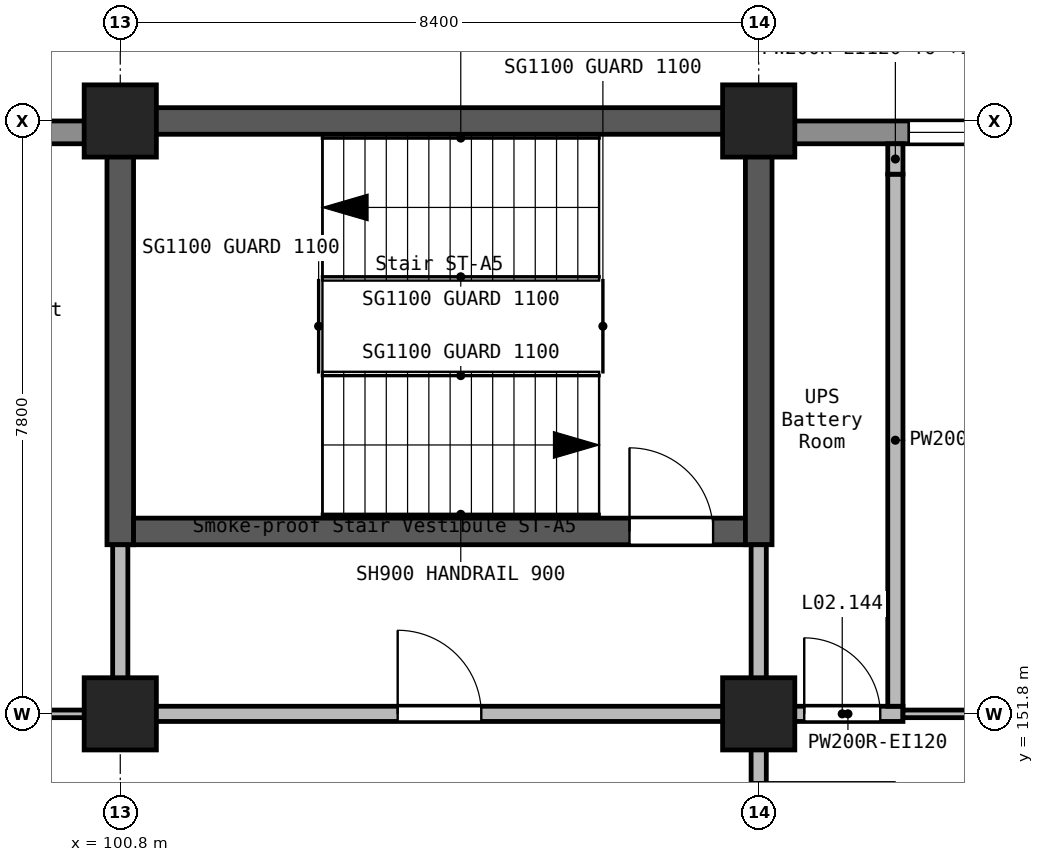
"""IFC4 building model, lengths in metres.
Left out: names, types, materials, properties, quantities, classifications, styles, units other than length and angle.
Written with IfcOpenShell. Run it as: python <this file> out.ifc"""

import sys

from ifc_helpers import new_model, si_unit, direction, frame, frame_2d, origin, origin_2d, place, context, subcontext, project, spatial, rectangle, extrude, element, fill, save


model = new_model("IFC4")
c1 = context("Model", 3, precision=1e-05, world=origin(), true_north=direction((0.0, 1.0)))
c2 = subcontext(c1, "Body", "Model", "MODEL_VIEW")
j1 = project(units=[si_unit("LENGTHUNIT", "METRE"), si_unit("PLANEANGLEUNIT", "RADIAN")], contexts=[c1])
p1 = place(None, origin())
s1 = spatial("IfcSite", under=j1, at=p1, CompositionType="ELEMENT")
p2 = place(p1, origin())
s2 = spatial("IfcBuilding", under=s1, at=p2, CompositionType="ELEMENT")
p3 = place(p2, frame((0.0, 0.0, 12.6)))
s3 = spatial("IfcBuildingStorey", under=s2, at=p3, CompositionType="ELEMENT", Elevation=12.6)
for number, where, z_axis, x_axis in (
    (1, (100.8, 151.8, 0.0), (0.0, 0.0, 1.0), (1.0, 0.0, 0.0)),
    (2, (100.8, 159.6, 0.0), (0.0, 0.0, 1.0), (1.0, 0.0, 0.0)),
    (3, (109.2, 151.8, 0.0), (0.0, 0.0, 1.0), (1.0, 0.0, 0.0)),
    (4, (109.2, 159.6, 0.0), (0.0, 0.0, 1.0), (1.0, 0.0, 0.0)),
):
    element("IfcColumn", number, at=place(p3, frame(where, z_axis=z_axis, x_axis=x_axis)), inside=s3, PredefinedType="COLUMN", context=c2, shape_type="SweptSolid", body=[
        extrude(rectangle(XDim=0.95, YDim=0.95, at=origin_2d()), origin(), (0.0, 0.0, 1.0), 4.2),
    ])
p4 = place(p3, frame((100.625, 159.6, 0.0), z_axis=(0.0, 0.0, 1.0), x_axis=(1.0, 0.0, 0.0)))
e5 = element("IfcWall", 5, at=p4, inside=s3, PredefinedType="SHEAR", context=c2, shape_type="SweptSolid", body=[
    extrude(rectangle(XDim=8.4, YDim=0.35, at=frame_2d((4.2, 0.0))), origin(), (0.0, 0.0, 1.0), 4.2),
])
p5 = place(p3, frame((100.8, 154.025, 0.0), z_axis=(0.0, 0.0, 1.0), x_axis=(0.0, 1.0, 0.0)))
e6 = element("IfcWall", 6, at=p5, inside=s3, PredefinedType="SHEAR", context=c2, shape_type="SweptSolid", body=[
    extrude(rectangle(XDim=5.4, YDim=0.35, at=frame_2d((2.7, 0.0))), origin(), (0.0, 0.0, 1.0), 4.2),
])
p6 = place(p3, frame((100.975, 154.2, 0.0), z_axis=(0.0, 0.0, 1.0), x_axis=(1.0, 0.0, 0.0)))
e7 = element("IfcWall", 7, at=p6, inside=s3, PredefinedType="SHEAR", context=c2, shape_type="SweptSolid", body=[
    extrude(rectangle(XDim=8.05, YDim=0.35, at=frame_2d((4.025, 0.0))), origin(), (0.0, 0.0, 1.0), 4.2),
])
p7 = place(p6, frame((6.525, 0.0, 0.0)))
e8 = element("IfcOpeningElement", 8, at=p7, cuts=e7, PredefinedType="OPENING", context=c2, shape_type="SweptSolid", body=[
    extrude(rectangle(XDim=1.1, YDim=2.1, at=frame_2d((0.55, 1.05))), frame((0.0, 0.185, 0.0), z_axis=(0.0, -1.0, 0.0), x_axis=(1.0, 0.0, 0.0)), (0.0, 0.0, 1.0), 0.37),
])
p8 = place(p3, frame((109.2, 154.025, 0.0), z_axis=(0.0, 0.0, 1.0), x_axis=(0.0, 1.0, 0.0)))
e9 = element("IfcWall", 9, at=p8, inside=s3, PredefinedType="SHEAR", context=c2, shape_type="SweptSolid", body=[
    extrude(rectangle(XDim=5.75, YDim=0.35, at=frame_2d((2.875, 0.0))), origin(), (0.0, 0.0, 1.0), 4.2),
])
p9 = place(p3, frame((117.15, 159.45, 0.0), z_axis=(0.0, 0.0, 1.0), x_axis=(-1.0, 0.0, 0.0)))
e10 = element("IfcWall", 10, at=p9, inside=s3, PredefinedType="STANDARD", context=c2, shape_type="SweptSolid", body=[
    extrude(rectangle(XDim=7.5, YDim=0.3, at=frame_2d((3.75, 0.0))), origin(), (0.0, 0.0, 1.0), 3.05),
])
p10 = place(p9, frame((0.975, 0.0, 0.9)))
e11 = element("IfcOpeningElement", 11, at=p10, cuts=e10, PredefinedType="OPENING", context=c2, shape_type="SweptSolid", body=[
    extrude(rectangle(XDim=1.8, YDim=1.5, at=frame_2d((0.9, 0.75))), frame((0.0, 0.16, 0.0), z_axis=(0.0, -1.0, 0.0), x_axis=(1.0, 0.0, 0.0)), (0.0, 0.0, 1.0), 0.32),
])
p11 = place(p9, frame((4.175, 0.0, 0.9)))
e12 = element("IfcOpeningElement", 12, at=p11, cuts=e10, PredefinedType="OPENING", context=c2, shape_type="SweptSolid", body=[
    extrude(rectangle(XDim=1.8, YDim=1.5, at=frame_2d((0.9, 0.75))), frame((0.0, 0.16, 0.0), z_axis=(0.0, -1.0, 0.0), x_axis=(1.0, 0.0, 0.0)), (0.0, 0.0, 1.0), 0.32),
])
p12 = place(p3, frame((100.35, 159.45, 0.0), z_axis=(0.0, 0.0, 1.0), x_axis=(-1.0, 0.0, 0.0)))
e13 = element("IfcWall", 13, at=p12, inside=s3, PredefinedType="STANDARD", context=c2, shape_type="SweptSolid", body=[
    extrude(rectangle(XDim=7.5, YDim=0.3, at=frame_2d((3.75, 0.0))), origin(), (0.0, 0.0, 1.0), 3.05),
])
p13 = place(p12, frame((0.575, 0.0, 0.9)))
e14 = element("IfcOpeningElement", 14, at=p13, cuts=e13, PredefinedType="OPENING", context=c2, shape_type="SweptSolid", body=[
    extrude(rectangle(XDim=1.8, YDim=1.5, at=frame_2d((0.9, 0.75))), frame((0.0, 0.16, 0.0), z_axis=(0.0, -1.0, 0.0), x_axis=(1.0, 0.0, 0.0)), (0.0, 0.0, 1.0), 0.32),
])
p14 = place(p12, frame((4.725, 0.0, 0.9)))
e15 = element("IfcOpeningElement", 15, at=p14, cuts=e13, PredefinedType="OPENING", context=c2, shape_type="SweptSolid", body=[
    extrude(rectangle(XDim=1.8, YDim=1.5, at=frame_2d((0.9, 0.75))), frame((0.0, 0.16, 0.0), z_axis=(0.0, -1.0, 0.0), x_axis=(1.0, 0.0, 0.0)), (0.0, 0.0, 1.0), 0.32),
])
p15 = place(p3, frame((109.2, 154.025, 0.0), z_axis=(0.0, 0.0, 1.0), x_axis=(0.0, -1.0, 0.0)))
e16 = element("IfcWall", 16, at=p15, inside=s3, PredefinedType="SOLIDWALL", context=c2, shape_type="SweptSolid", body=[
    extrude(rectangle(XDim=1.775, YDim=0.2, at=frame_2d((0.887, 0.0))), origin(), (0.0, 0.0, 1.0), 3.85),
])
p16 = place(p3, frame((109.2, 151.35, 0.0), z_axis=(0.0, 0.0, 1.0), x_axis=(0.0, -1.0, 0.0)))
e17 = element("IfcWall", 17, at=p16, inside=s3, PredefinedType="SOLIDWALL", context=c2, shape_type="SweptSolid", body=[
    extrude(rectangle(XDim=2.7, YDim=0.2, at=frame_2d((1.35, 0.0))), origin(), (0.0, 0.0, 1.0), 3.85),
])
p17 = place(p16, frame((0.45, 0.0, 0.0)))
e18 = element("IfcOpeningElement", 18, at=p17, cuts=e17, PredefinedType="OPENING", context=c2, shape_type="SweptSolid", body=[
    extrude(rectangle(XDim=1.8, YDim=2.1, at=frame_2d((0.9, 1.05))), frame((0.0, 0.11, 0.0), z_axis=(0.0, -1.0, 0.0), x_axis=(1.0, 0.0, 0.0)), (0.0, 0.0, 1.0), 0.22),
])
p18 = place(p3, frame((101.25, 151.8, 0.0), z_axis=(0.0, 0.0, 1.0), x_axis=(1.0, 0.0, 0.0)))
e19 = element("IfcWall", 19, at=p18, inside=s3, PredefinedType="SOLIDWALL", context=c2, shape_type="SweptSolid", body=[
    extrude(rectangle(XDim=7.5, YDim=0.2, at=frame_2d((3.75, 0.0))), origin(), (0.0, 0.0, 1.0), 3.85),
])
p19 = place(p18, frame((3.2, 0.0, 0.0)))
e20 = element("IfcOpeningElement", 20, at=p19, cuts=e19, PredefinedType="OPENING", context=c2, shape_type="SweptSolid", body=[
    extrude(rectangle(XDim=1.1, YDim=2.1, at=frame_2d((0.55, 1.05))), frame((0.0, 0.11, 0.0), z_axis=(0.0, -1.0, 0.0), x_axis=(1.0, 0.0, 0.0)), (0.0, 0.0, 1.0), 0.22),
])
p20 = place(p3, frame((109.65, 151.8, 0.0), z_axis=(0.0, 0.0, 1.0), x_axis=(1.0, 0.0, 0.0)))
e21 = element("IfcWall", 21, at=p20, inside=s3, PredefinedType="SOLIDWALL", context=c2, shape_type="SweptSolid", body=[
    extrude(rectangle(XDim=1.448, YDim=0.2, at=frame_2d((0.724, 0.0))), origin(), (0.0, 0.0, 1.0), 3.85),
])
p21 = place(p20, frame((0.149, 0.0, 0.0)))
e22 = element("IfcOpeningElement", 22, at=p21, cuts=e21, PredefinedType="OPENING", context=c2, shape_type="SweptSolid", body=[
    extrude(rectangle(XDim=1.0, YDim=2.1, at=frame_2d((0.5, 1.05))), frame((0.0, 0.11, 0.0), z_axis=(0.0, -1.0, 0.0), x_axis=(1.0, 0.0, 0.0)), (0.0, 0.0, 1.0), 0.22),
])
p22 = place(p3, frame((110.998, 151.9, 0.0), z_axis=(0.0, 0.0, 1.0), x_axis=(0.0, 1.0, 0.0)))
e23 = element("IfcWall", 23, at=p22, inside=s3, PredefinedType="SOLIDWALL", context=c2, shape_type="SweptSolid", body=[
    extrude(rectangle(XDim=7.0, YDim=0.2, at=frame_2d((3.5, 0.0))), origin(), (0.0, 0.0, 1.0), 3.85),
])
p23 = place(p3, frame((110.998, 158.9, 0.0), z_axis=(0.0, 0.0, 1.0), x_axis=(0.0, 1.0, 0.0)))
e24 = element("IfcWall", 24, at=p23, inside=s3, PredefinedType="SOLIDWALL", context=c2, shape_type="SweptSolid", body=[
    extrude(rectangle(XDim=0.4, YDim=0.2, at=frame_2d((0.2, 0.0))), origin(), (0.0, 0.0, 1.0), 3.08),
])
p24 = place(p3, frame((100.8, 152.25, 0.0), z_axis=(0.0, 0.0, 1.0), x_axis=(0.0, 1.0, 0.0)))
e25 = element("IfcWall", 25, at=p24, inside=s3, PredefinedType="SOLIDWALL", context=c2, shape_type="SweptSolid", body=[
    extrude(rectangle(XDim=1.775, YDim=0.2, at=frame_2d((0.887, 0.0))), origin(), (0.0, 0.0, 1.0), 3.85),
])
p25 = place(p3, frame((117.15, 151.8, 0.0), z_axis=(0.0, 0.0, 1.0), x_axis=(-1.0, 0.0, 0.0)))
e26 = element("IfcWall", 26, at=p25, inside=s3, PredefinedType="PARTITIONING", context=c2, shape_type="SweptSolid", body=[
    extrude(rectangle(XDim=6.052, YDim=0.1, at=frame_2d((3.026, 0.0))), origin(), (0.0, 0.0, 1.0), 3.85),
])
p26 = place(p25, frame((2.401, 0.0, 0.0)))
e27 = element("IfcOpeningElement", 27, at=p26, cuts=e26, PredefinedType="OPENING", context=c2, shape_type="SweptSolid", body=[
    extrude(rectangle(XDim=0.9, YDim=2.1, at=frame_2d((0.45, 1.05))), frame((0.0, 0.06, 0.0), z_axis=(0.0, -1.0, 0.0), x_axis=(1.0, 0.0, 0.0)), (0.0, 0.0, 1.0), 0.12),
])
p27 = place(p3, frame((92.85, 151.8, 0.0), z_axis=(0.0, 0.0, 1.0), x_axis=(1.0, 0.0, 0.0)))
e28 = element("IfcWall", 28, at=p27, inside=s3, PredefinedType="PARTITIONING", context=c2, shape_type="SweptSolid", body=[
    extrude(rectangle(XDim=7.5, YDim=0.1, at=frame_2d((3.75, 0.0))), origin(), (0.0, 0.0, 1.0), 3.85),
])
p28 = place(p27, frame((1.349, 0.0, 0.0)))
e29 = element("IfcOpeningElement", 29, at=p28, cuts=e28, PredefinedType="OPENING", context=c2, shape_type="SweptSolid", body=[
    extrude(rectangle(XDim=1.8, YDim=2.1, at=frame_2d((0.9, 1.05))), frame((0.0, 0.06, 0.0), z_axis=(0.0, -1.0, 0.0), x_axis=(1.0, 0.0, 0.0)), (0.0, 0.0, 1.0), 0.12),
])
p29 = place(p27, frame((5.999, 0.0, 0.0)))
e30 = element("IfcOpeningElement", 30, at=p29, cuts=e28, PredefinedType="OPENING", context=c2, shape_type="SweptSolid", body=[
    extrude(rectangle(XDim=0.9, YDim=2.1, at=frame_2d((0.45, 1.05))), frame((0.0, 0.06, 0.0), z_axis=(0.0, -1.0, 0.0), x_axis=(1.0, 0.0, 0.0)), (0.0, 0.0, 1.0), 0.12),
])
p30 = place(p11, origin())
e31 = element("IfcWindow", 31, at=p30, inside=s3, PartitioningType="SINGLE_PANEL", PredefinedType="WINDOW", context=c2, shape_type="SweptSolid", body=[
    extrude(rectangle(XDim=1.8, YDim=1.5, at=frame_2d((0.9, 0.75))), frame((0.0, 0.03, 0.0), z_axis=(0.0, -1.0, 0.0), x_axis=(1.0, 0.0, 0.0)), (0.0, 0.0, 1.0), 0.06),
])
fill(e12, e31)
p31 = place(p17, frame((1.8, 0.0, 0.0), z_axis=(0.0, 0.0, 1.0), x_axis=(-1.0, 0.0, 0.0)))
e32 = element("IfcDoor", 32, at=p31, inside=s3, OperationType="DOUBLE_DOOR_SINGLE_SWING", PredefinedType="DOOR", context=c2, shape_type="SweptSolid", body=[
    extrude(rectangle(XDim=1.8, YDim=2.1, at=frame_2d((0.9, 1.05))), frame((0.0, 0.025, 0.0), z_axis=(0.0, -1.0, 0.0), x_axis=(1.0, 0.0, 0.0)), (0.0, 0.0, 1.0), 0.05),
])
fill(e18, e32)
p32 = place(p7, origin())
e33 = element("IfcDoor", 33, at=p32, inside=s3, OperationType="SINGLE_SWING_RIGHT", PredefinedType="DOOR", context=c2, shape_type="SweptSolid", body=[
    extrude(rectangle(XDim=1.1, YDim=2.1, at=frame_2d((0.55, 1.05))), frame((0.0, 0.025, 0.0), z_axis=(0.0, -1.0, 0.0), x_axis=(1.0, 0.0, 0.0)), (0.0, 0.0, 1.0), 0.05),
])
fill(e8, e33)
p33 = place(p19, origin())
e34 = element("IfcDoor", 34, at=p33, inside=s3, OperationType="SINGLE_SWING_RIGHT", PredefinedType="DOOR", context=c2, shape_type="SweptSolid", body=[
    extrude(rectangle(XDim=1.1, YDim=2.1, at=frame_2d((0.55, 1.05))), frame((0.0, 0.025, 0.0), z_axis=(0.0, -1.0, 0.0), x_axis=(1.0, 0.0, 0.0)), (0.0, 0.0, 1.0), 0.05),
])
fill(e20, e34)
p34 = place(p21, origin())
e35 = element("IfcDoor", 35, at=p34, inside=s3, OperationType="SINGLE_SWING_LEFT", PredefinedType="DOOR", context=c2, shape_type="SweptSolid", body=[
    extrude(rectangle(XDim=1.0, YDim=2.1, at=frame_2d((0.5, 1.05))), frame((0.0, 0.025, 0.0), z_axis=(0.0, -1.0, 0.0), x_axis=(1.0, 0.0, 0.0)), (0.0, 0.0, 1.0), 0.05),
])
fill(e22, e35)
save(model, sys.argv[1])
